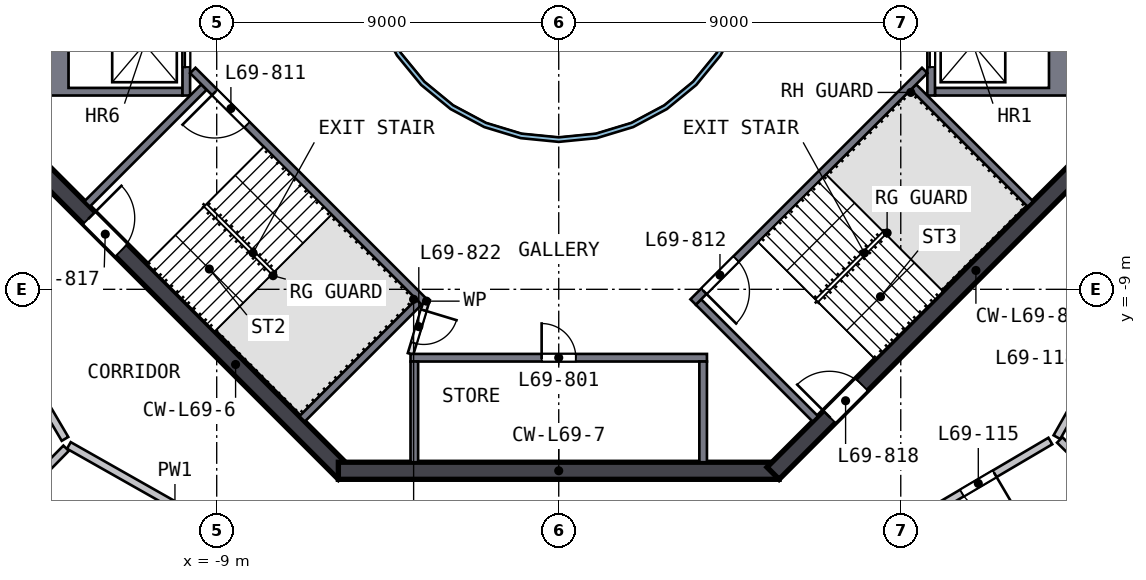
"""IFC4 building model, lengths in metres.
Left out: names, types, materials, properties, quantities, classifications, styles, units other than length and angle.
Written with IfcOpenShell. Run it as: python <this file> out.ifc"""

import sys

from ifc_helpers import new_model, si_unit, direction, frame, frame_2d, origin, place, context, subcontext, project, spatial, polyline, rectangle, outline, extrude, element, fill, save


model = new_model("IFC4")
c1 = context("Model", 3, precision=1e-05, world=origin(), true_north=direction((0.0, 1.0)))
c2 = subcontext(c1, "Body", "Model", "MODEL_VIEW")
j1 = project(units=[si_unit("LENGTHUNIT", "METRE"), si_unit("PLANEANGLEUNIT", "RADIAN")], contexts=[c1])
p1 = place(None, origin())
s1 = spatial("IfcSite", under=j1, at=p1, CompositionType="ELEMENT")
p2 = place(p1, origin())
s2 = spatial("IfcBuilding", under=s1, at=p2, CompositionType="ELEMENT")
p3 = place(p2, frame((0.0, 0.0, 281.0)))
s3 = spatial("IfcBuildingStorey", under=s2, at=p3, CompositionType="ELEMENT", Elevation=281.0)
p4 = place(p3, frame((-13.841, -5.64, 0.0), z_axis=(0.0, 0.0, 1.0), x_axis=(0.707106781, -0.707106781, 0.0)))
e1 = element("IfcWall", 1, at=p4, inside=s3, PredefinedType="SHEAR", context=c2, shape_type="SweptSolid", body=[
    extrude(rectangle(XDim=11.598, YDim=0.45, at=frame_2d((5.799, 0.0))), origin(), (0.0, 0.0, 1.0), 3.5),
])
p5 = place(p4, frame((2.099, 0.0, 0.0)))
e2 = element("IfcOpeningElement", 2, at=p5, cuts=e1, PredefinedType="OPENING", context=c2, shape_type="SweptSolid", body=[
    extrude(rectangle(XDim=1.2, YDim=2.1, at=frame_2d((0.6, 1.05))), frame((0.0, 0.235, 0.0), z_axis=(0.0, -1.0, 0.0), x_axis=(1.0, 0.0, 0.0)), (0.0, 0.0, 1.0), 0.47),
])
p6 = place(p3, frame((-5.799, -13.775, 0.0), z_axis=(0.0, 0.0, 1.0), x_axis=(1.0, 0.0, 0.0)))
e3 = element("IfcWall", 3, at=p6, inside=s3, PredefinedType="SHEAR", context=c2, shape_type="SweptSolid", body=[
    extrude(rectangle(XDim=11.598, YDim=0.45, at=frame_2d((5.799, 0.0))), origin(), (0.0, 0.0, 1.0), 3.5),
])
p7 = place(p3, frame((5.64, -13.841, 0.0), z_axis=(0.0, 0.0, 1.0), x_axis=(0.707106781, 0.707106781, 0.0)))
e4 = element("IfcWall", 4, at=p7, inside=s3, PredefinedType="SHEAR", context=c2, shape_type="SweptSolid", body=[
    extrude(rectangle(XDim=11.598, YDim=0.45, at=frame_2d((5.799, 0.0))), origin(), (0.0, 0.0, 1.0), 3.5),
])
p8 = place(p7, frame((2.099, 0.0, 0.0)))
e5 = element("IfcOpeningElement", 5, at=p8, cuts=e4, PredefinedType="OPENING", context=c2, shape_type="SweptSolid", body=[
    extrude(rectangle(XDim=1.2, YDim=2.1, at=frame_2d((0.6, 1.05))), frame((0.0, 0.235, 0.0), z_axis=(0.0, -1.0, 0.0), x_axis=(1.0, 0.0, 0.0)), (0.0, 0.0, 1.0), 0.47),
])
p9 = place(p3, origin())
e6 = element("IfcWall", 6, at=p9, inside=s3, PredefinedType="SOLIDWALL", context=c2, shape_type="SweptSolid", body=[
    extrude(outline(polyline([(13.55, -3.9), (9.9, -3.9), (9.9, -3.7), (12.9, -3.7), (12.9, -1.4), (9.9, -1.4), (9.9, -1.2), (13.55, -1.2), (13.55, -3.9)])), origin(), (0.0, 0.0, 1.0), 3.19),
])
p10 = place(p3, frame((9.8, -1.2, 0.0), z_axis=(0.0, 0.0, 1.0), x_axis=(0.0, -1.0, 0.0)))
e7 = element("IfcWall", 7, at=p10, inside=s3, PredefinedType="SOLIDWALL", context=c2, shape_type="SweptSolid", body=[
    extrude(rectangle(XDim=2.7, YDim=0.2, at=frame_2d((1.35, 0.0))), origin(), (0.0, 0.0, 1.0), 3.19),
])
p11 = place(p10, frame((0.75, 0.0, 0.0)))
e8 = element("IfcOpeningElement", 8, at=p11, cuts=e7, PredefinedType="OPENING", context=c2, shape_type="SweptSolid", body=[
    extrude(rectangle(XDim=1.2, YDim=2.1, at=frame_2d((0.6, 1.05))), frame((0.0, 0.11, 0.0), z_axis=(0.0, -1.0, 0.0), x_axis=(1.0, 0.0, 0.0)), (0.0, 0.0, 1.0), 0.22),
])
p12 = place(p3, origin())
e9 = element("IfcWall", 9, at=p12, inside=s3, PredefinedType="SOLIDWALL", context=c2, shape_type="SweptSolid", body=[
    extrude(outline(polyline([(-13.55, -3.9), (-13.55, -1.2), (-9.9, -1.2), (-9.9, -1.4), (-12.9, -1.4), (-12.9, -3.7), (-9.9, -3.7), (-9.9, -3.9), (-13.55, -3.9)])), origin(), (0.0, 0.0, 1.0), 3.19),
])
p13 = place(p3, frame((-9.8, -1.2, 0.0), z_axis=(0.0, 0.0, 1.0), x_axis=(0.0, -1.0, 0.0)))
e10 = element("IfcWall", 10, at=p13, inside=s3, PredefinedType="SOLIDWALL", context=c2, shape_type="SweptSolid", body=[
    extrude(rectangle(XDim=2.7, YDim=0.2, at=frame_2d((1.35, 0.0))), origin(), (0.0, 0.0, 1.0), 3.19),
])
p14 = place(p13, frame((0.75, 0.0, 0.0)))
e11 = element("IfcOpeningElement", 11, at=p14, cuts=e10, PredefinedType="OPENING", context=c2, shape_type="SweptSolid", body=[
    extrude(rectangle(XDim=1.2, YDim=2.1, at=frame_2d((0.6, 1.05))), frame((0.0, 0.11, 0.0), z_axis=(0.0, -1.0, 0.0), x_axis=(1.0, 0.0, 0.0)), (0.0, 0.0, 1.0), 0.22),
])
p15 = place(p3, frame((-3.9, -10.8, 0.0), z_axis=(0.0, 0.0, 1.0), x_axis=(1.0, 0.0, 0.0)))
e12 = element("IfcWall", 12, at=p15, inside=s3, PredefinedType="SOLIDWALL", context=c2, shape_type="SweptSolid", body=[
    extrude(rectangle(XDim=7.8, YDim=0.2, at=frame_2d((3.9, 0.0))), origin(), (0.0, 0.0, 1.0), 3.19),
])
p16 = place(p15, frame((3.45, 0.0, 0.0)))
e13 = element("IfcOpeningElement", 13, at=p16, cuts=e12, PredefinedType="OPENING", context=c2, shape_type="SweptSolid", body=[
    extrude(rectangle(XDim=0.9, YDim=2.1, at=frame_2d((0.45, 1.05))), frame((0.0, 0.11, 0.0), z_axis=(0.0, -1.0, 0.0), x_axis=(1.0, 0.0, 0.0)), (0.0, 0.0, 1.0), 0.22),
])
for number, where, z_axis, x_axis in (
    (14, (-3.8, -10.9, 0.0), (0.0, 0.0, 1.0), (0.0, -1.0, 0.0)),
    (15, (3.8, -10.9, 0.0), (0.0, 0.0, 1.0), (0.0, -1.0, 0.0)),
):
    element("IfcWall", number, at=place(p3, frame(where, z_axis=z_axis, x_axis=x_axis)), inside=s3, PredefinedType="SOLIDWALL", context=c2, shape_type="SweptSolid", body=[
        extrude(rectangle(XDim=2.65, YDim=0.2, at=frame_2d((1.325, 0.0))), origin(), (0.0, 0.0, 1.0), 3.19),
    ])
p17 = place(p3, frame((-3.535, -9.334, 0.0), z_axis=(0.0, 0.0, 1.0), x_axis=(-0.707120946, 0.707092617, 0.0)))
e16 = element("IfcWall", 16, at=p17, inside=s3, PredefinedType="SOLIDWALL", context=c2, shape_type="SweptSolid", body=[
    extrude(rectangle(XDim=8.618, YDim=0.2, at=frame_2d((4.309, 0.0))), origin(), (0.0, 0.0, 1.0), 3.19),
])
p18 = place(p17, frame((6.6, 0.0, 0.0)))
e17 = element("IfcOpeningElement", 17, at=p18, cuts=e16, PredefinedType="OPENING", context=c2, shape_type="SweptSolid", body=[
    extrude(rectangle(XDim=1.2, YDim=2.1, at=frame_2d((0.6, 1.05))), frame((0.0, 0.11, 0.0), z_axis=(0.0, -1.0, 0.0), x_axis=(1.0, 0.0, 0.0)), (0.0, 0.0, 1.0), 0.22),
])
for number, where, z_axis, x_axis in (
    (18, (-9.334, -3.677, 0.0), (0.0, 0.0, 1.0), (-0.707, -0.707, 0.0)),
    (19, (-3.677, -9.334, 0.0), (0.0, 0.0, 1.0), (-0.707, -0.707, 0.0)),
):
    element("IfcWall", number, at=place(p3, frame(where, z_axis=z_axis, x_axis=x_axis)), inside=s3, PredefinedType="SOLIDWALL", context=c2, shape_type="SweptSolid", body=[
        extrude(rectangle(XDim=4.35, YDim=0.2, at=frame_2d((2.175, 0.0))), origin(), (0.0, 0.0, 1.0), 3.19),
    ])
p19 = place(p3, frame((9.629, -3.24, 0.0), z_axis=(0.0, 0.0, 1.0), x_axis=(-0.707120946, -0.707092617, 0.0)))
e20 = element("IfcWall", 20, at=p19, inside=s3, PredefinedType="SOLIDWALL", context=c2, shape_type="SweptSolid", body=[
    extrude(rectangle(XDim=8.618, YDim=0.2, at=frame_2d((4.309, 0.0))), origin(), (0.0, 0.0, 1.0), 3.19),
])
p20 = place(p19, frame((7.018, 0.0, 0.0)))
e21 = element("IfcOpeningElement", 21, at=p20, cuts=e20, PredefinedType="OPENING", context=c2, shape_type="SweptSolid", body=[
    extrude(rectangle(XDim=1.2, YDim=2.1, at=frame_2d((0.6, 1.05))), frame((0.0, 0.11, 0.0), z_axis=(0.0, -1.0, 0.0), x_axis=(1.0, 0.0, 0.0)), (0.0, 0.0, 1.0), 0.22),
])
for number, where, z_axis, x_axis in (
    (22, (3.677, -9.334, 0.0), (0.0, 0.0, 1.0), (0.707, -0.707, 0.0)),
    (23, (9.334, -3.677, 0.0), (0.0, 0.0, 1.0), (0.707, -0.707, 0.0)),
):
    element("IfcWall", number, at=place(p3, frame(where, z_axis=z_axis, x_axis=x_axis)), inside=s3, PredefinedType="SOLIDWALL", context=c2, shape_type="SweptSolid", body=[
        extrude(rectangle(XDim=4.35, YDim=0.2, at=frame_2d((2.175, 0.0))), origin(), (0.0, 0.0, 1.0), 3.19),
    ])
p21 = place(p3, frame((-3.465, -9.263, 0.0), z_axis=(0.0, 0.0, 1.0), x_axis=(-0.289808785, -0.957084567, 0.0)))
e24 = element("IfcWall", 24, at=p21, inside=s3, PredefinedType="PARTITIONING", context=c2, shape_type="SweptSolid", body=[
    extrude(rectangle(XDim=1.501, YDim=0.15, at=frame_2d((0.75, 0.0))), origin(), (0.0, 0.0, 1.0), 3.19),
])
p22 = place(p21, frame((0.301, 0.0, 0.0)))
e25 = element("IfcOpeningElement", 25, at=p22, cuts=e24, PredefinedType="OPENING", context=c2, shape_type="SweptSolid", body=[
    extrude(rectangle(XDim=0.9, YDim=2.1, at=frame_2d((0.45, 1.05))), frame((0.0, 0.085, 0.0), z_axis=(0.0, -1.0, 0.0), x_axis=(1.0, 0.0, 0.0)), (0.0, 0.0, 1.0), 0.17),
])
p23 = place(p3, origin())
e26 = element("IfcWall", 26, at=p23, inside=s3, PredefinedType="SOLIDWALL", context=c2, shape_type="SweptSolid", body=[
    extrude(outline(polyline([(5.021, -0.999), (4.73, -1.959), (4.257, -2.844), (3.62, -3.62), (2.844, -4.257), (1.959, -4.73), (0.999, -5.021), (0.0, -5.12), (-0.999, -5.021), (-1.959, -4.73), (-2.844, -4.257), (-3.62, -3.62), (-4.257, -2.844), (-4.73, -1.959), (-5.021, -0.999), (-5.12, 0.0), (-5.021, 0.999), (-4.73, 1.959), (-4.257, 2.844), (-3.62, 3.62), (-2.844, 4.257), (-1.959, 4.73), (-0.999, 5.021), (0.0, 5.12), (0.999, 5.021), (1.959, 4.73), (2.844, 4.257), (3.62, 3.62), (4.257, 2.844), (4.73, 1.959), (5.021, 0.999), (5.12, 0.0), (5.021, -0.999)]), holes=[polyline([(4.904, 0.976), (4.619, 1.913), (4.157, 2.778), (3.535, 3.535), (2.778, 4.157), (1.913, 4.619), (0.976, 4.904), (0.0, 5.0), (-0.976, 4.904), (-1.913, 4.619), (-2.778, 4.157), (-3.535, 3.535), (-4.157, 2.778), (-4.619, 1.913), (-4.904, 0.976), (-5.0, 0.0), (-4.904, -0.976), (-4.619, -1.913), (-4.157, -2.778), (-3.535, -3.535), (-2.778, -4.157), (-1.913, -4.619), (-0.976, -4.904), (0.0, -5.0), (0.976, -4.904), (1.913, -4.619), (2.778, -4.157), (3.535, -3.535), (4.157, -2.778), (4.619, -1.913), (4.904, -0.976), (5.0, 0.0), (4.904, 0.976)])]), origin(), (0.0, 0.0, 1.0), 3.19),
])
p24 = place(p3, frame((-12.992, -12.936, 0.0), z_axis=(0.0, 0.0, 1.0), x_axis=(-0.507232662, 0.861809159, 0.0)))
e27 = element("IfcWall", 27, at=p24, inside=s3, PredefinedType="SOLIDWALL", context=c2, shape_type="SweptSolid", body=[
    extrude(rectangle(XDim=9.337, YDim=0.2, at=frame_2d((4.668, 0.0))), origin(), (0.0, 0.0, 1.0), 3.19),
])
p25 = place(p24, frame((6.408, 0.0, 0.0)))
e28 = element("IfcOpeningElement", 28, at=p25, cuts=e27, PredefinedType="OPENING", context=c2, shape_type="SweptSolid", body=[
    extrude(rectangle(XDim=1.0, YDim=2.1, at=frame_2d((0.5, 1.05))), frame((0.0, 0.11, 0.0), z_axis=(0.0, -1.0, 0.0), x_axis=(1.0, 0.0, 0.0)), (0.0, 0.0, 1.0), 0.22),
])
p26 = place(p3, frame((-4.609, -17.798, 0.0), z_axis=(0.0, 0.0, 1.0), x_axis=(-0.870179862, 0.492734216, 0.0)))
e29 = element("IfcWall", 29, at=p26, inside=s3, PredefinedType="SOLIDWALL", context=c2, shape_type="SweptSolid", body=[
    extrude(rectangle(XDim=9.517, YDim=0.2, at=frame_2d((4.758, 0.0))), origin(), (0.0, 0.0, 1.0), 3.19),
])
p27 = place(p26, frame((1.9, 0.0, 0.0)))
e30 = element("IfcOpeningElement", 30, at=p27, cuts=e29, PredefinedType="OPENING", context=c2, shape_type="SweptSolid", body=[
    extrude(rectangle(XDim=1.0, YDim=2.1, at=frame_2d((0.5, 1.05))), frame((0.0, 0.11, 0.0), z_axis=(0.0, -1.0, 0.0), x_axis=(1.0, 0.0, 0.0)), (0.0, 0.0, 1.0), 0.22),
])
p28 = place(p3, frame((12.936, -12.992, 0.0), z_axis=(0.0, 0.0, 1.0), x_axis=(-0.861805451, -0.507238962, 0.0)))
e31 = element("IfcWall", 31, at=p28, inside=s3, PredefinedType="SOLIDWALL", context=c2, shape_type="SweptSolid", body=[
    extrude(rectangle(XDim=9.116, YDim=0.2, at=frame_2d((4.558, 0.0))), origin(), (0.0, 0.0, 1.0), 3.19),
])
p29 = place(p28, frame((1.7, 0.0, 0.0)))
e32 = element("IfcOpeningElement", 32, at=p29, cuts=e31, PredefinedType="OPENING", context=c2, shape_type="SweptSolid", body=[
    extrude(rectangle(XDim=1.0, YDim=2.1, at=frame_2d((0.5, 1.05))), frame((0.0, 0.11, 0.0), z_axis=(0.0, -1.0, 0.0), x_axis=(1.0, 0.0, 0.0)), (0.0, 0.0, 1.0), 0.22),
])
p30 = place(p3, frame((17.699, -4.783, 0.0), z_axis=(0.0, 0.0, 1.0), x_axis=(-0.492728899, -0.870182873, 0.0)))
e33 = element("IfcWall", 33, at=p30, inside=s3, PredefinedType="SOLIDWALL", context=c2, shape_type="SweptSolid", body=[
    extrude(rectangle(XDim=9.317, YDim=0.2, at=frame_2d((4.658, 0.0))), origin(), (0.0, 0.0, 1.0), 3.19),
])
p31 = place(p30, frame((6.458, 0.0, 0.0)))
e34 = element("IfcOpeningElement", 34, at=p31, cuts=e33, PredefinedType="OPENING", context=c2, shape_type="SweptSolid", body=[
    extrude(rectangle(XDim=1.0, YDim=2.1, at=frame_2d((0.5, 1.05))), frame((0.0, 0.11, 0.0), z_axis=(0.0, -1.0, 0.0), x_axis=(1.0, 0.0, 0.0)), (0.0, 0.0, 1.0), 0.22),
])
p32 = place(p3, frame((-12.963, -13.182, 0.0), z_axis=(0.0, 0.0, 1.0), x_axis=(-0.701186576, -0.71297783, 0.0)))
e35 = element("IfcWall", 35, at=p32, inside=s3, PredefinedType="SOLIDWALL", context=c2, shape_type="SweptSolid", body=[
    extrude(rectangle(XDim=3.416, YDim=0.2, at=frame_2d((1.708, 0.0))), origin(), (0.0, 0.0, 1.0), 3.19),
])
p33 = place(p3, frame((13.182, -12.963, 0.0), z_axis=(0.0, 0.0, 1.0), x_axis=(0.712982214, -0.701182118, 0.0)))
e36 = element("IfcWall", 36, at=p33, inside=s3, PredefinedType="SOLIDWALL", context=c2, shape_type="SweptSolid", body=[
    extrude(rectangle(XDim=6.476, YDim=0.2, at=frame_2d((3.238, 0.0))), origin(), (0.0, 0.0, 1.0), 3.19),
])
p34 = place(p16, origin())
e37 = element("IfcDoor", 37, at=p34, inside=s3, OperationType="SINGLE_SWING_LEFT", PredefinedType="DOOR", context=c2, shape_type="SweptSolid", body=[
    extrude(rectangle(XDim=0.9, YDim=2.1, at=frame_2d((0.45, 1.05))), frame((0.0, 0.025, 0.0), z_axis=(0.0, -1.0, 0.0), x_axis=(1.0, 0.0, 0.0)), (0.0, 0.0, 1.0), 0.05),
])
fill(e13, e37)
p35 = place(p11, origin())
e38 = element("IfcDoor", 38, at=p35, inside=s3, OperationType="DOUBLE_DOOR_SLIDING", PredefinedType="DOOR", context=c2, shape_type="SweptSolid", body=[
    extrude(rectangle(XDim=1.2, YDim=2.1, at=frame_2d((0.6, 1.05))), frame((0.0, 0.025, 0.0), z_axis=(0.0, -1.0, 0.0), x_axis=(1.0, 0.0, 0.0)), (0.0, 0.0, 1.0), 0.05),
])
fill(e8, e38)
p36 = place(p14, origin())
e39 = element("IfcDoor", 39, at=p36, inside=s3, OperationType="DOUBLE_DOOR_SLIDING", PredefinedType="DOOR", context=c2, shape_type="SweptSolid", body=[
    extrude(rectangle(XDim=1.2, YDim=2.1, at=frame_2d((0.6, 1.05))), frame((0.0, 0.025, 0.0), z_axis=(0.0, -1.0, 0.0), x_axis=(1.0, 0.0, 0.0)), (0.0, 0.0, 1.0), 0.05),
])
fill(e11, e39)
p37 = place(p18, origin())
e40 = element("IfcDoor", 40, at=p37, inside=s3, OperationType="SINGLE_SWING_RIGHT", PredefinedType="DOOR", context=c2, shape_type="SweptSolid", body=[
    extrude(rectangle(XDim=1.2, YDim=2.1, at=frame_2d((0.6, 1.05))), frame((0.0, 0.025, 0.0), z_axis=(0.0, -1.0, 0.0), x_axis=(1.0, 0.0, 0.0)), (0.0, 0.0, 1.0), 0.05),
])
fill(e17, e40)
p38 = place(p20, origin())
e41 = element("IfcDoor", 41, at=p38, inside=s3, OperationType="SINGLE_SWING_RIGHT", PredefinedType="DOOR", context=c2, shape_type="SweptSolid", body=[
    extrude(rectangle(XDim=1.2, YDim=2.1, at=frame_2d((0.6, 1.05))), frame((0.0, 0.025, 0.0), z_axis=(0.0, -1.0, 0.0), x_axis=(1.0, 0.0, 0.0)), (0.0, 0.0, 1.0), 0.05),
])
fill(e21, e41)
p39 = place(p5, origin())
e42 = element("IfcDoor", 42, at=p39, inside=s3, OperationType="SINGLE_SWING_LEFT", PredefinedType="DOOR", context=c2, shape_type="SweptSolid", body=[
    extrude(rectangle(XDim=1.2, YDim=2.1, at=frame_2d((0.6, 1.05))), frame((0.0, 0.025, 0.0), z_axis=(0.0, -1.0, 0.0), x_axis=(1.0, 0.0, 0.0)), (0.0, 0.0, 1.0), 0.05),
])
fill(e2, e42)
p40 = place(p8, origin())
e43 = element("IfcDoor", 43, at=p40, inside=s3, OperationType="SINGLE_SWING_LEFT", PredefinedType="DOOR", context=c2, shape_type="SweptSolid", body=[
    extrude(rectangle(XDim=1.2, YDim=2.1, at=frame_2d((0.6, 1.05))), frame((0.0, 0.025, 0.0), z_axis=(0.0, -1.0, 0.0), x_axis=(1.0, 0.0, 0.0)), (0.0, 0.0, 1.0), 0.05),
])
fill(e5, e43)
p41 = place(p22, origin())
e44 = element("IfcDoor", 44, at=p41, inside=s3, OperationType="SINGLE_SWING_LEFT", PredefinedType="DOOR", context=c2, shape_type="SweptSolid", body=[
    extrude(rectangle(XDim=0.9, YDim=2.1, at=frame_2d((0.45, 1.05))), frame((0.0, 0.025, 0.0), z_axis=(0.0, -1.0, 0.0), x_axis=(1.0, 0.0, 0.0)), (0.0, 0.0, 1.0), 0.05),
])
fill(e25, e44)
p42 = place(p29, origin())
e45 = element("IfcDoor", 45, at=p42, inside=s3, OperationType="SINGLE_SWING_LEFT", PredefinedType="DOOR", context=c2, shape_type="SweptSolid", body=[
    extrude(rectangle(XDim=1.0, YDim=2.1, at=frame_2d((0.5, 1.05))), frame((0.0, 0.025, 0.0), z_axis=(0.0, -1.0, 0.0), x_axis=(1.0, 0.0, 0.0)), (0.0, 0.0, 1.0), 0.05),
])
fill(e32, e45)
save(model, sys.argv[1])
